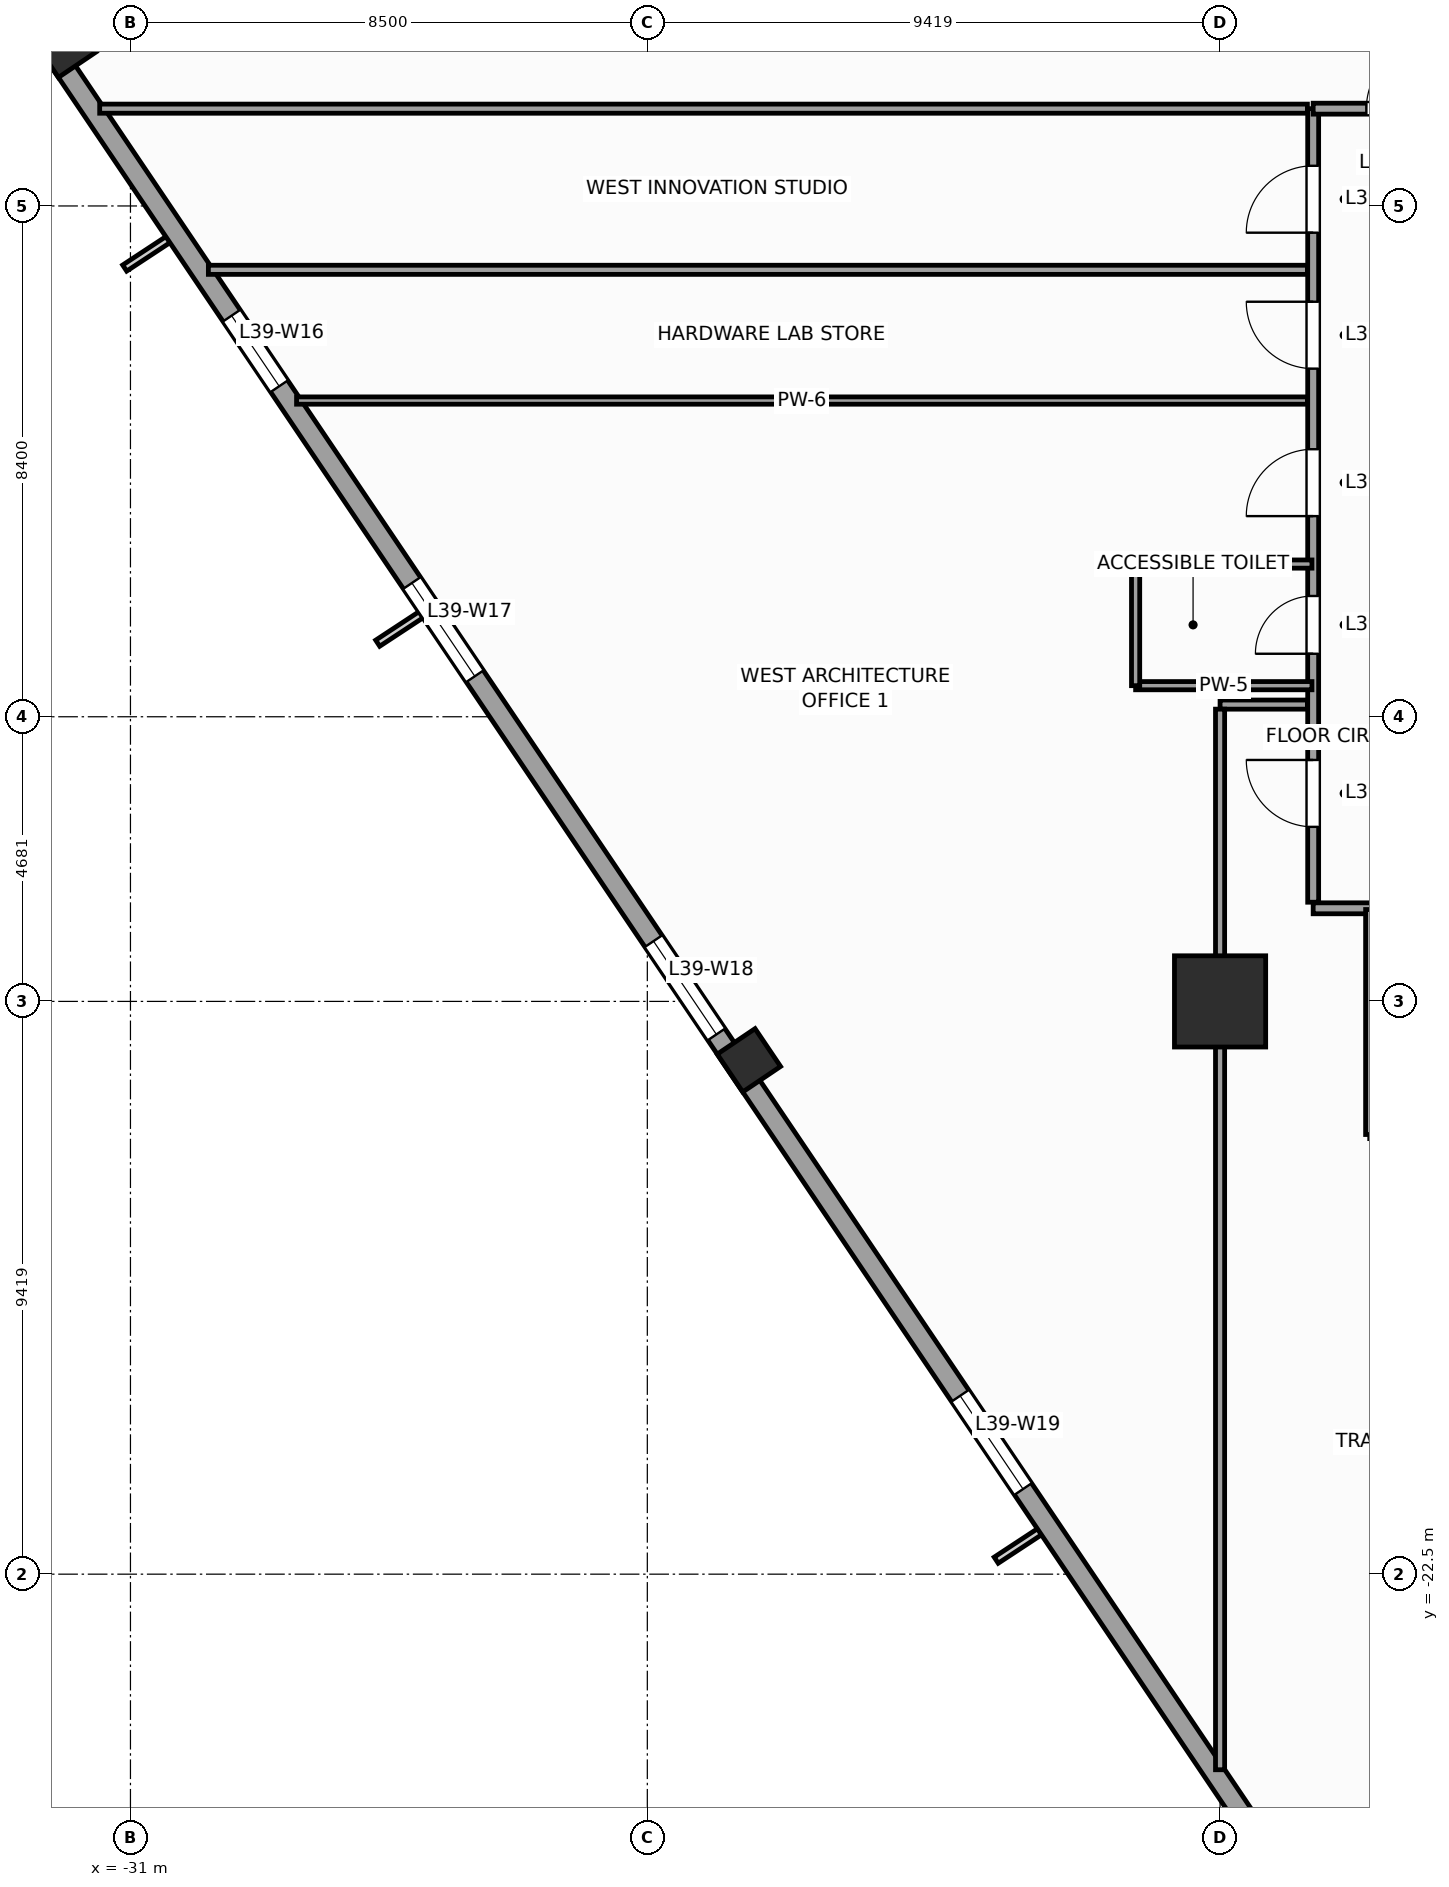
"""IFC4 building model, lengths in metres.
Left out: names, types, materials, properties, quantities, classifications, styles, units other than length and angle.
Written with IfcOpenShell. Run it as: python <this file> out.ifc"""

import sys

from ifc_helpers import new_model, si_unit, direction, frame, frame_2d, origin, origin_2d, place, context, subcontext, project, spatial, rectangle, extrude, source, transform, mapped, element, fill, save


model = new_model("IFC4")
c1 = context("Model", 3, precision=1e-05, world=origin(), true_north=direction((0.0, 1.0)))
c2 = subcontext(c1, "Body", "Model", "MODEL_VIEW")
j1 = project(units=[si_unit("LENGTHUNIT", "METRE"), si_unit("PLANEANGLEUNIT", "RADIAN")], contexts=[c1])
p1 = place(None, origin())
s1 = spatial("IfcSite", under=j1, at=p1, CompositionType="ELEMENT")
p2 = place(p1, origin())
s2 = spatial("IfcBuilding", under=s1, at=p2, CompositionType="ELEMENT")
p3 = place(p2, frame((0.0, 0.0, 164.4)))
s3 = spatial("IfcBuildingStorey", under=s2, at=p3, CompositionType="ELEMENT", Elevation=164.4)
m1 = source(origin(), c2, "Body", "SweptSolid", [
    extrude(rectangle(XDim=1.5, YDim=1.5, at=origin_2d()), origin(), (0.0, 0.0, 1.0), 4.0),
])
p4 = place(p3, frame((-13.081, -13.081, 0.0), z_axis=(0.0, 0.0, 1.0), x_axis=(1.0, 0.0, 0.0)))
e1 = element("IfcColumn", 1, at=p4, inside=s3, PredefinedType="COLUMN", context=c2, shape_type="MappedRepresentation", body=[
    mapped(m1, transform((0.0, 0.0, 0.0), scale=1.0)),
])
m2 = source(origin(), c2, "Body", "SweptSolid", [
    extrude(rectangle(XDim=0.75, YDim=0.75, at=origin_2d()), origin(), (0.0, 0.0, 1.0), 4.0),
])
for number, where, z_axis, x_axis in (
    (2, (-32.083, 2.635, 0.0), (0.0, 0.0, 1.0), (0.829, 0.559, 0.0)),
    (3, (-20.83, -14.05, 0.0), (0.0, 0.0, 1.0), (0.829, 0.559, 0.0)),
):
    element("IfcColumn", number, at=place(p3, frame(where, z_axis=z_axis, x_axis=x_axis)), inside=s3, PredefinedType="COLUMN", context=c2, shape_type="MappedRepresentation", body=[
        mapped(m2, transform((0.0, 0.0, 0.0), scale=1.0)),
    ])
p5 = place(p3, frame((-28.223, 5.486, 0.0), z_axis=(0.0, 0.0, 1.0), x_axis=(-0.82905227345, -0.559171107879, 0.0)))
e4 = element("IfcWall", 4, at=p5, inside=s3, PredefinedType="STANDARD", context=c2, shape_type="SweptSolid", body=[
    extrude(rectangle(XDim=5.17, YDim=0.34, at=frame_2d((2.585, 0.0))), origin(), (0.0, 0.0, 1.0), 3.04),
])
p6 = place(p5, frame((1.885, 0.0, 0.56)))
e5 = element("IfcOpeningElement", 5, at=p6, cuts=e4, PredefinedType="OPENING", context=c2, shape_type="SweptSolid", body=[
    extrude(rectangle(XDim=1.4, YDim=2.4, at=frame_2d((0.7, 1.2))), frame((0.0, 0.18, 0.0), z_axis=(0.0, -1.0, 0.0), x_axis=(1.0, 0.0, 0.0)), (0.0, 0.0, 1.0), 0.36),
])
p7 = place(p3, frame((-32.558, 2.972, 0.0), z_axis=(0.0, 0.0, 1.0), x_axis=(0.559194910251, -0.829036218961, 0.0)))
e6 = element("IfcWall", 6, at=p7, inside=s3, PredefinedType="STANDARD", context=c2, shape_type="SweptSolid", body=[
    extrude(rectangle(XDim=41.34, YDim=0.34, at=frame_2d((20.67, 0.0))), origin(), (0.0, 0.0, 1.0), 3.04),
])
p8 = place(p7, frame((5.761, 0.0, 0.56)))
e7 = element("IfcOpeningElement", 7, at=p8, cuts=e6, PredefinedType="OPENING", context=c2, shape_type="SweptSolid", body=[
    extrude(rectangle(XDim=1.4, YDim=2.4, at=frame_2d((0.7, 1.2))), frame((0.0, 0.18, 0.0), z_axis=(0.0, -1.0, 0.0), x_axis=(1.0, 0.0, 0.0)), (0.0, 0.0, 1.0), 0.36),
])
p9 = place(p7, frame((11.064, 0.0, 0.61)))
e8 = element("IfcOpeningElement", 8, at=p9, cuts=e6, PredefinedType="OPENING", context=c2, shape_type="SweptSolid", body=[
    extrude(rectangle(XDim=1.85, YDim=2.35, at=frame_2d((0.925, 1.175))), frame((0.0, 0.18, 0.0), z_axis=(0.0, -1.0, 0.0), x_axis=(1.0, 0.0, 0.0)), (0.0, 0.0, 1.0), 0.36),
])
p10 = place(p7, frame((18.168, 0.0, 0.61)))
e9 = element("IfcOpeningElement", 9, at=p10, cuts=e6, PredefinedType="OPENING", context=c2, shape_type="SweptSolid", body=[
    extrude(rectangle(XDim=1.85, YDim=2.35, at=frame_2d((0.925, 1.175))), frame((0.0, 0.18, 0.0), z_axis=(0.0, -1.0, 0.0), x_axis=(1.0, 0.0, 0.0)), (0.0, 0.0, 1.0), 0.36),
])
p11 = place(p7, frame((27.186, 0.0, 0.61)))
e10 = element("IfcOpeningElement", 10, at=p11, cuts=e6, PredefinedType="OPENING", context=c2, shape_type="SweptSolid", body=[
    extrude(rectangle(XDim=1.85, YDim=2.35, at=frame_2d((0.925, 1.175))), frame((0.0, 0.18, 0.0), z_axis=(0.0, -1.0, 0.0), x_axis=(1.0, 0.0, 0.0)), (0.0, 0.0, 1.0), 0.36),
])
p12 = place(p7, frame((35.602, 0.0, 0.56)))
e11 = element("IfcOpeningElement", 11, at=p12, cuts=e6, PredefinedType="OPENING", context=c2, shape_type="SweptSolid", body=[
    extrude(rectangle(XDim=1.4, YDim=2.4, at=frame_2d((0.7, 1.2))), frame((0.0, 0.18, 0.0), z_axis=(0.0, -1.0, 0.0), x_axis=(1.0, 0.0, 0.0)), (0.0, 0.0, 1.0), 0.36),
])
p13 = place(p3, frame((-11.55, -11.55, 0.0), z_axis=(0.0, 0.0, 1.0), x_axis=(1.0, 0.0, 0.0)))
e12 = element("IfcWall", 12, at=p13, inside=s3, PredefinedType="PARTITIONING", context=c2, shape_type="SweptSolid", body=[
    extrude(rectangle(XDim=22.0, YDim=0.18, at=frame_2d((11.0, 0.0))), origin(), (0.0, 0.0, 1.0), 3.74),
])
p14 = place(p13, frame((1.58, 0.0, 0.0)))
e13 = element("IfcOpeningElement", 13, at=p14, cuts=e12, PredefinedType="OPENING", context=c2, shape_type="SweptSolid", body=[
    extrude(rectangle(XDim=0.95, YDim=2.1, at=frame_2d((0.475, 1.05))), frame((0.0, 0.1, 0.0), z_axis=(0.0, -1.0, 0.0), x_axis=(1.0, 0.0, 0.0)), (0.0, 0.0, 1.0), 0.2),
])
p15 = place(p13, frame((6.75, 0.0, 0.0)))
e14 = element("IfcOpeningElement", 14, at=p15, cuts=e12, PredefinedType="OPENING", context=c2, shape_type="SweptSolid", body=[
    extrude(rectangle(XDim=1.1, YDim=2.2, at=frame_2d((0.55, 1.1))), frame((0.0, 0.1, 0.0), z_axis=(0.0, -1.0, 0.0), x_axis=(1.0, 0.0, 0.0)), (0.0, 0.0, 1.0), 0.2),
])
p16 = place(p13, frame((11.25, 0.0, 0.0)))
e15 = element("IfcOpeningElement", 15, at=p16, cuts=e12, PredefinedType="OPENING", context=c2, shape_type="SweptSolid", body=[
    extrude(rectangle(XDim=1.1, YDim=2.2, at=frame_2d((0.55, 1.1))), frame((0.0, 0.1, 0.0), z_axis=(0.0, -1.0, 0.0), x_axis=(1.0, 0.0, 0.0)), (0.0, 0.0, 1.0), 0.2),
])
p17 = place(p13, frame((15.75, 0.0, 0.0)))
e16 = element("IfcOpeningElement", 16, at=p17, cuts=e12, PredefinedType="OPENING", context=c2, shape_type="SweptSolid", body=[
    extrude(rectangle(XDim=1.1, YDim=2.2, at=frame_2d((0.55, 1.1))), frame((0.0, 0.1, 0.0), z_axis=(0.0, -1.0, 0.0), x_axis=(1.0, 0.0, 0.0)), (0.0, 0.0, 1.0), 0.2),
])
p18 = place(p13, frame((19.561, 0.0, 0.0)))
e17 = element("IfcOpeningElement", 17, at=p18, cuts=e12, PredefinedType="OPENING", context=c2, shape_type="SweptSolid", body=[
    extrude(rectangle(XDim=1.1, YDim=2.2, at=frame_2d((0.55, 1.1))), frame((0.0, 0.1, 0.0), z_axis=(0.0, -1.0, 0.0), x_axis=(1.0, 0.0, 0.0)), (0.0, 0.0, 1.0), 0.2),
])
p19 = place(p3, frame((-11.55, -11.45, 0.0), z_axis=(0.0, 0.0, 1.0), x_axis=(0.0, 1.0, 0.0)))
e18 = element("IfcWall", 18, at=p19, inside=s3, PredefinedType="PARTITIONING", context=c2, shape_type="SweptSolid", body=[
    extrude(rectangle(XDim=13.05, YDim=0.18, at=frame_2d((6.525, 0.0))), origin(), (0.0, 0.0, 1.0), 3.74),
])
p20 = place(p19, frame((4.086, 0.0, 0.0)))
e19 = element("IfcOpeningElement", 19, at=p20, cuts=e18, PredefinedType="OPENING", context=c2, shape_type="SweptSolid", body=[
    extrude(rectangle(XDim=0.95, YDim=2.1, at=frame_2d((0.475, 1.05))), frame((0.0, 0.1, 0.0), z_axis=(0.0, -1.0, 0.0), x_axis=(1.0, 0.0, 0.0)), (0.0, 0.0, 1.0), 0.2),
])
p21 = place(p19, frame((11.01, 0.0, 0.0)))
e20 = element("IfcOpeningElement", 20, at=p21, cuts=e18, PredefinedType="OPENING", context=c2, shape_type="SweptSolid", body=[
    extrude(rectangle(XDim=1.1, YDim=2.2, at=frame_2d((0.55, 1.1))), frame((0.0, 0.1, 0.0), z_axis=(0.0, -1.0, 0.0), x_axis=(1.0, 0.0, 0.0)), (0.0, 0.0, 1.0), 0.2),
])
p22 = place(p19, frame((8.775, 0.0, 0.0)))
e21 = element("IfcOpeningElement", 21, at=p22, cuts=e18, PredefinedType="OPENING", context=c2, shape_type="SweptSolid", body=[
    extrude(rectangle(XDim=1.1, YDim=2.2, at=frame_2d((0.55, 1.1))), frame((0.0, 0.1, 0.0), z_axis=(0.0, -1.0, 0.0), x_axis=(1.0, 0.0, 0.0)), (0.0, 0.0, 1.0), 0.2),
])
p23 = place(p19, frame((6.35, 0.0, 0.0)))
e22 = element("IfcOpeningElement", 22, at=p23, cuts=e18, PredefinedType="OPENING", context=c2, shape_type="SweptSolid", body=[
    extrude(rectangle(XDim=1.1, YDim=2.2, at=frame_2d((0.55, 1.1))), frame((0.0, 0.1, 0.0), z_axis=(0.0, -1.0, 0.0), x_axis=(1.0, 0.0, 0.0)), (0.0, 0.0, 1.0), 0.2),
])
p24 = place(p19, frame((1.24, 0.0, 0.0)))
e23 = element("IfcOpeningElement", 23, at=p24, cuts=e18, PredefinedType="OPENING", context=c2, shape_type="SweptSolid", body=[
    extrude(rectangle(XDim=1.1, YDim=2.2, at=frame_2d((0.55, 1.1))), frame((0.0, 0.1, 0.0), z_axis=(0.0, -1.0, 0.0), x_axis=(1.0, 0.0, 0.0)), (0.0, 0.0, 1.0), 0.2),
])
p25 = place(p3, frame((-11.55, 1.6, 0.0), z_axis=(0.0, 0.0, 1.0), x_axis=(1.0, 0.0, 0.0)))
e24 = element("IfcWall", 24, at=p25, inside=s3, PredefinedType="PARTITIONING", context=c2, shape_type="SweptSolid", body=[
    extrude(rectangle(XDim=2.85, YDim=0.18, at=frame_2d((1.425, 0.0))), origin(), (0.0, 0.0, 1.0), 3.74),
])
p26 = place(p25, frame((0.875, 0.0, 0.0)))
e25 = element("IfcOpeningElement", 25, at=p26, cuts=e24, PredefinedType="OPENING", context=c2, shape_type="SweptSolid", body=[
    extrude(rectangle(XDim=1.1, YDim=2.2, at=frame_2d((0.55, 1.1))), frame((0.0, 0.1, 0.0), z_axis=(0.0, -1.0, 0.0), x_axis=(1.0, 0.0, 0.0)), (0.0, 0.0, 1.0), 0.2),
])
p27 = place(p3, frame((-29.719, -1.05, 0.0), z_axis=(0.0, 0.0, 1.0), x_axis=(1.0, 0.0, 0.0)))
e26 = element("IfcWall", 26, at=p27, inside=s3, PredefinedType="PARTITIONING", context=c2, shape_type="SweptSolid", body=[
    extrude(rectangle(XDim=18.073, YDim=0.15, at=frame_2d((9.037, 0.0))), origin(), (0.0, 0.0, 1.0), 3.74),
])
p28 = place(p3, frame((-31.506, 1.6, 0.0), z_axis=(0.0, 0.0, 1.0), x_axis=(1.0, 0.0, 0.0)))
e27 = element("IfcWall", 27, at=p28, inside=s3, PredefinedType="PARTITIONING", context=c2, shape_type="SweptSolid", body=[
    extrude(rectangle(XDim=19.861, YDim=0.15, at=frame_2d((9.931, 0.0))), origin(), (0.0, 0.0, 1.0), 3.74),
])
p29 = place(p3, frame((-11.645, -8.2, 0.0), z_axis=(0.0, 0.0, 1.0), x_axis=(-1.0, 0.0, 0.0)))
e28 = element("IfcWall", 28, at=p29, inside=s3, PredefinedType="PARTITIONING", context=c2, shape_type="SweptSolid", body=[
    extrude(rectangle(XDim=1.436, YDim=0.15, at=frame_2d((0.718, 0.0))), origin(), (0.0, 0.0, 1.0), 3.74),
])
p30 = place(p3, frame((-13.081, -8.275, 0.0), z_axis=(0.0, 0.0, 1.0), x_axis=(0.0, -1.0, 0.0)))
e29 = element("IfcWall", 29, at=p30, inside=s3, PredefinedType="PARTITIONING", context=c2, shape_type="SweptSolid", body=[
    extrude(rectangle(XDim=17.441, YDim=0.15, at=frame_2d((8.721, 0.0))), origin(), (0.0, 0.0, 1.0), 2.84),
])
p31 = place(p3, frame((-28.268, -3.2, 0.0), z_axis=(0.0, 0.0, 1.0), x_axis=(1.0, 0.0, 0.0)))
e30 = element("IfcWall", 30, at=p31, inside=s3, PredefinedType="PARTITIONING", context=c2, shape_type="SweptSolid", body=[
    extrude(rectangle(XDim=16.623, YDim=0.12, at=frame_2d((8.312, 0.0))), origin(), (0.0, 0.0, 1.0), 3.74),
])
for number, where, z_axis, x_axis in (
    (31, (-14.47, -7.889, 0.0), (0.0, 0.0, 1.0), (1.0, 0.0, 0.0)),
    (32, (-14.47, -5.889, 0.0), (0.0, 0.0, 1.0), (1.0, 0.0, 0.0)),
):
    element("IfcWall", number, at=place(p3, frame(where, z_axis=z_axis, x_axis=x_axis)), inside=s3, PredefinedType="PARTITIONING", context=c2, shape_type="SweptSolid", body=[
        extrude(rectangle(XDim=2.9, YDim=0.135, at=frame_2d((1.45, 0.0))), origin(), (0.0, 0.0, 1.0), 3.74),
    ])
p32 = place(p3, frame((-14.47, -7.889, 0.0), z_axis=(0.0, 0.0, 1.0), x_axis=(0.0, 1.0, 0.0)))
e33 = element("IfcWall", 33, at=p32, inside=s3, PredefinedType="PARTITIONING", context=c2, shape_type="SweptSolid", body=[
    extrude(rectangle(XDim=2.0, YDim=0.135, at=frame_2d((1.0, 0.0))), origin(), (0.0, 0.0, 1.0), 3.74),
])
p33 = place(p3, frame((-10.62, -15.27, 0.0), z_axis=(0.0, 0.0, 1.0), x_axis=(0.0, 1.0, 0.0)))
e34 = element("IfcWall", 34, at=p33, inside=s3, PredefinedType="PARTITIONING", context=c2, shape_type="SweptSolid", body=[
    extrude(rectangle(XDim=3.7, YDim=0.135, at=frame_2d((1.85, 0.0))), origin(), (0.0, 0.0, 1.0), 3.74),
])
m3 = source(origin(), c2, "Body", "SweptSolid", [
    extrude(rectangle(XDim=1.4, YDim=2.4, at=frame_2d((0.7, 1.2))), frame((0.0, 0.03, 0.0), z_axis=(0.0, -1.0, 0.0), x_axis=(1.0, 0.0, 0.0)), (0.0, 0.0, 1.0), 0.06),
])
p34 = place(p8, origin())
e35 = element("IfcWindow", 35, at=p34, inside=s3, PartitioningType="SINGLE_PANEL", PredefinedType="WINDOW", context=c2, shape_type="MappedRepresentation", body=[
    mapped(m3, transform((0.0, 0.0, 0.0), scale=1.0)),
])
fill(e7, e35)
m4 = source(origin(), c2, "Body", "SweptSolid", [
    extrude(rectangle(XDim=1.85, YDim=2.35, at=frame_2d((0.925, 1.175))), frame((0.0, 0.03, 0.0), z_axis=(0.0, -1.0, 0.0), x_axis=(1.0, 0.0, 0.0)), (0.0, 0.0, 1.0), 0.06),
])
p35 = place(p9, origin())
e36 = element("IfcWindow", 36, at=p35, inside=s3, PartitioningType="SINGLE_PANEL", PredefinedType="WINDOW", context=c2, shape_type="MappedRepresentation", body=[
    mapped(m4, transform((0.0, 0.0, 0.0), scale=1.0)),
])
fill(e8, e36)
p36 = place(p10, origin())
e37 = element("IfcWindow", 37, at=p36, inside=s3, PartitioningType="SINGLE_PANEL", PredefinedType="WINDOW", context=c2, shape_type="MappedRepresentation", body=[
    mapped(m4, transform((0.0, 0.0, 0.0), scale=1.0)),
])
fill(e9, e37)
p37 = place(p11, origin())
e38 = element("IfcWindow", 38, at=p37, inside=s3, PartitioningType="SINGLE_PANEL", PredefinedType="WINDOW", context=c2, shape_type="MappedRepresentation", body=[
    mapped(m4, transform((0.0, 0.0, 0.0), scale=1.0)),
])
fill(e10, e38)
m5 = source(origin(), c2, "Body", "SweptSolid", [
    extrude(rectangle(XDim=0.95, YDim=2.1, at=frame_2d((0.475, 1.05))), frame((0.0, 0.025, 0.0), z_axis=(0.0, -1.0, 0.0), x_axis=(1.0, 0.0, 0.0)), (0.0, 0.0, 1.0), 0.05),
])
p38 = place(p20, origin())
e39 = element("IfcDoor", 39, at=p38, inside=s3, OperationType="SINGLE_SWING_LEFT", PredefinedType="DOOR", context=c2, shape_type="MappedRepresentation", body=[
    mapped(m5, transform((0.0, 0.0, 0.0), scale=1.0)),
])
fill(e19, e39)
m6 = source(origin(), c2, "Body", "SweptSolid", [
    extrude(rectangle(XDim=1.1, YDim=2.2, at=frame_2d((0.55, 1.1))), frame((0.0, 0.025, 0.0), z_axis=(0.0, -1.0, 0.0), x_axis=(1.0, 0.0, 0.0)), (0.0, 0.0, 1.0), 0.05),
])
p39 = place(p21, origin())
e40 = element("IfcDoor", 40, at=p39, inside=s3, OperationType="SINGLE_SWING_LEFT", PredefinedType="DOOR", context=c2, shape_type="MappedRepresentation", body=[
    mapped(m6, transform((0.0, 0.0, 0.0), scale=1.0)),
])
fill(e20, e40)
p40 = place(p26, origin())
e41 = element("IfcDoor", 41, at=p40, inside=s3, OperationType="SINGLE_SWING_RIGHT", PredefinedType="DOOR", context=c2, shape_type="MappedRepresentation", body=[
    mapped(m6, transform((0.0, 0.0, 0.0), scale=1.0)),
])
fill(e25, e41)
p41 = place(p22, origin())
e42 = element("IfcDoor", 42, at=p41, inside=s3, OperationType="SINGLE_SWING_RIGHT", PredefinedType="DOOR", context=c2, shape_type="MappedRepresentation", body=[
    mapped(m6, transform((0.0, 0.0, 0.0), scale=1.0)),
])
fill(e21, e42)
p42 = place(p23, origin())
e43 = element("IfcDoor", 43, at=p42, inside=s3, OperationType="SINGLE_SWING_LEFT", PredefinedType="DOOR", context=c2, shape_type="MappedRepresentation", body=[
    mapped(m6, transform((0.0, 0.0, 0.0), scale=1.0)),
])
fill(e22, e43)
p43 = place(p24, origin())
e44 = element("IfcDoor", 44, at=p43, inside=s3, OperationType="SINGLE_SWING_RIGHT", PredefinedType="DOOR", context=c2, shape_type="MappedRepresentation", body=[
    mapped(m6, transform((0.0, 0.0, 0.0), scale=1.0)),
])
fill(e23, e44)
save(model, sys.argv[1])
